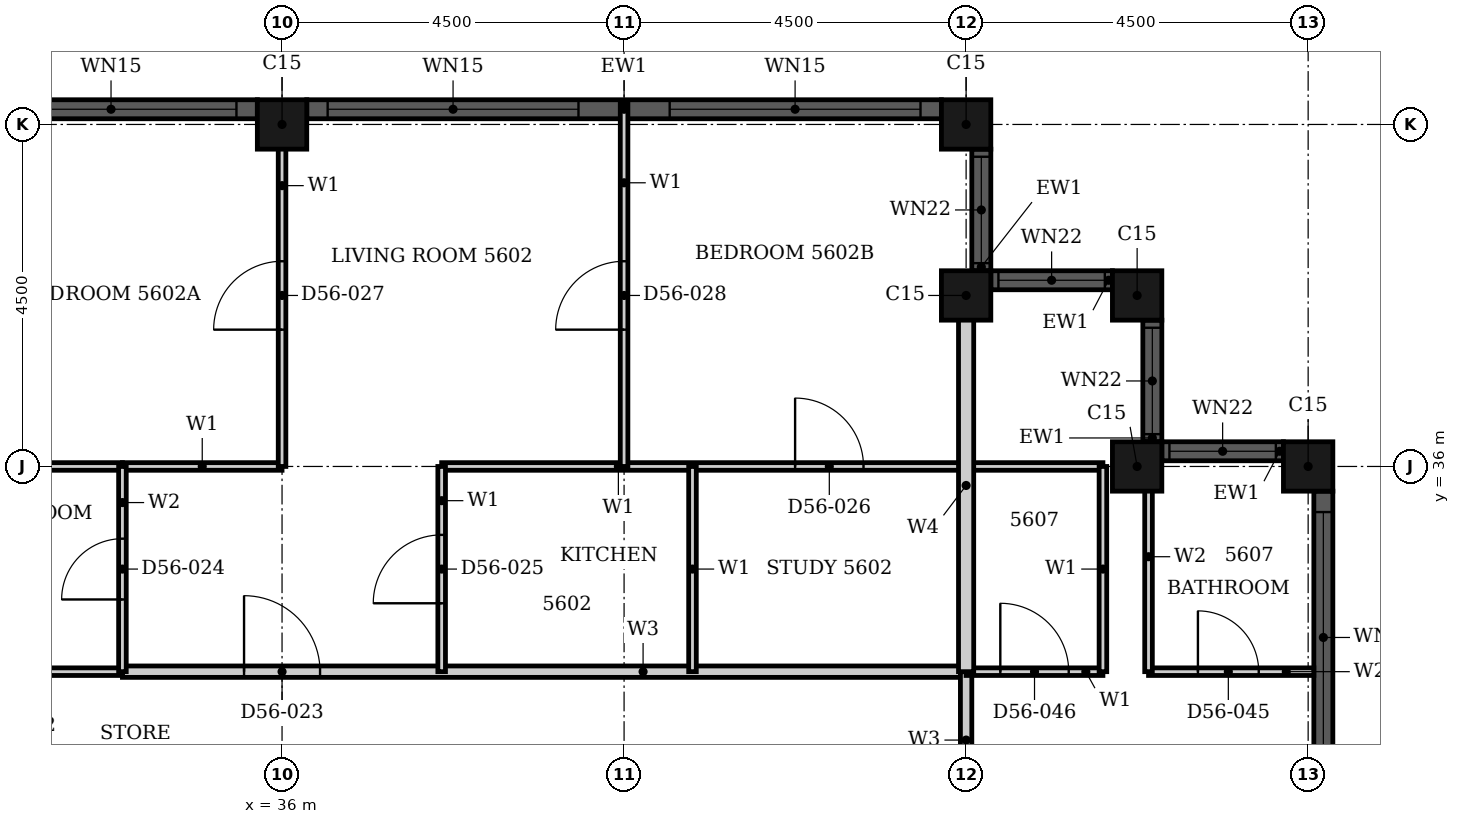
"""IFC4 building model, lengths in metres.
Left out: names, types, materials, properties, quantities, classifications, styles, units other than length and angle.
Written with IfcOpenShell. Run it as: python <this file> out.ifc"""

import sys

from ifc_helpers import new_model, si_unit, direction, frame, frame_2d, origin, origin_2d, place, context, subcontext, project, spatial, rectangle, hollow_rectangle, extrude, element, fill, save


model = new_model("IFC4")
c1 = context("Model", 3, precision=1e-05, world=origin(), true_north=direction((0.0, 1.0)))
c2 = subcontext(c1, "Body", "Model", "MODEL_VIEW")
j1 = project(units=[si_unit("LENGTHUNIT", "METRE"), si_unit("PLANEANGLEUNIT", "RADIAN")], contexts=[c1])
p1 = place(None, origin())
s1 = spatial("IfcSite", under=j1, at=p1, CompositionType="ELEMENT")
p2 = place(p1, origin())
s2 = spatial("IfcBuilding", under=s1, at=p2, CompositionType="ELEMENT")
p3 = place(p2, frame((0.0, 0.0, 222.0)))
s3 = spatial("IfcBuildingStorey", under=s2, at=p3, CompositionType="ELEMENT", Elevation=222.0)
for number, where, z_axis, x_axis in (
    (1, (49.5, 36.0, 0.0), (0.0, 0.0, 1.0), (1.0, 0.0, 0.0)),
    (2, (47.25, 36.0, 0.0), (0.0, 0.0, 1.0), (1.0, 0.0, 0.0)),
    (3, (47.25, 38.25, 0.0), (0.0, 0.0, 1.0), (1.0, 0.0, 0.0)),
    (4, (45.0, 38.25, 0.0), (0.0, 0.0, 1.0), (1.0, 0.0, 0.0)),
    (5, (45.0, 40.5, 0.0), (0.0, 0.0, 1.0), (1.0, 0.0, 0.0)),
    (6, (36.0, 40.5, 0.0), (0.0, 0.0, 1.0), (1.0, 0.0, 0.0)),
):
    element("IfcColumn", number, at=place(p3, frame(where, z_axis=z_axis, x_axis=x_axis)), inside=s3, PredefinedType="COLUMN", context=c2, shape_type="SweptSolid", body=[
        extrude(hollow_rectangle(XDim=0.65, YDim=0.65, WallThickness=0.021, at=origin_2d()), origin(), (0.0, 0.0, 1.0), 3.7),
    ])
p4 = place(p3, frame((49.7, 27.325, 0.0), z_axis=(0.0, 0.0, 1.0), x_axis=(0.0, 1.0, 0.0)))
e7 = element("IfcWall", 7, at=p4, inside=s3, PredefinedType="SOLIDWALL", context=c2, shape_type="SweptSolid", body=[
    extrude(rectangle(XDim=8.35, YDim=0.25, at=frame_2d((4.175, 0.0))), origin(), (0.0, 0.0, 1.0), 3.7),
])
p5 = place(p4, frame((0.275, 0.0, 0.45)))
e8 = element("IfcOpeningElement", 8, at=p5, cuts=e7, PredefinedType="OPENING", context=c2, shape_type="SweptSolid", body=[
    extrude(rectangle(XDim=3.3, YDim=2.3, at=frame_2d((1.65, 1.15))), frame((0.0, 0.135, 0.0), z_axis=(0.0, -1.0, 0.0), x_axis=(1.0, 0.0, 0.0)), (0.0, 0.0, 1.0), 0.27),
])
p6 = place(p4, frame((4.775, 0.0, 0.45)))
e9 = element("IfcOpeningElement", 9, at=p6, cuts=e7, PredefinedType="OPENING", context=c2, shape_type="SweptSolid", body=[
    extrude(rectangle(XDim=3.3, YDim=2.3, at=frame_2d((1.65, 1.15))), frame((0.0, 0.135, 0.0), z_axis=(0.0, -1.0, 0.0), x_axis=(1.0, 0.0, 0.0)), (0.0, 0.0, 1.0), 0.27),
])
p7 = place(p3, frame((49.175, 36.2, 0.0), z_axis=(0.0, 0.0, 1.0), x_axis=(-1.0, 0.0, 0.0)))
e10 = element("IfcWall", 10, at=p7, inside=s3, PredefinedType="SOLIDWALL", context=c2, shape_type="SweptSolid", body=[
    extrude(rectangle(XDim=1.6, YDim=0.25, at=frame_2d((0.8, 0.0))), origin(), (0.0, 0.0, 1.0), 3.7),
])
p8 = place(p7, frame((0.1, 0.0, 0.9)))
e11 = element("IfcOpeningElement", 11, at=p8, cuts=e10, PredefinedType="OPENING", context=c2, shape_type="SweptSolid", body=[
    extrude(rectangle(XDim=1.4, YDim=1.85, at=frame_2d((0.7, 0.925))), frame((0.0, 0.135, 0.0), z_axis=(0.0, -1.0, 0.0), x_axis=(1.0, 0.0, 0.0)), (0.0, 0.0, 1.0), 0.27),
])
p9 = place(p3, frame((47.45, 36.325, 0.0), z_axis=(0.0, 0.0, 1.0), x_axis=(0.0, 1.0, 0.0)))
e12 = element("IfcWall", 12, at=p9, inside=s3, PredefinedType="SOLIDWALL", context=c2, shape_type="SweptSolid", body=[
    extrude(rectangle(XDim=1.6, YDim=0.25, at=frame_2d((0.8, 0.0))), origin(), (0.0, 0.0, 1.0), 3.7),
])
p10 = place(p9, frame((0.1, 0.0, 0.9)))
e13 = element("IfcOpeningElement", 13, at=p10, cuts=e12, PredefinedType="OPENING", context=c2, shape_type="SweptSolid", body=[
    extrude(rectangle(XDim=1.4, YDim=1.85, at=frame_2d((0.7, 0.925))), frame((0.0, 0.135, 0.0), z_axis=(0.0, -1.0, 0.0), x_axis=(1.0, 0.0, 0.0)), (0.0, 0.0, 1.0), 0.27),
])
p11 = place(p3, frame((46.925, 38.45, 0.0), z_axis=(0.0, 0.0, 1.0), x_axis=(-1.0, 0.0, 0.0)))
e14 = element("IfcWall", 14, at=p11, inside=s3, PredefinedType="SOLIDWALL", context=c2, shape_type="SweptSolid", body=[
    extrude(rectangle(XDim=1.6, YDim=0.25, at=frame_2d((0.8, 0.0))), origin(), (0.0, 0.0, 1.0), 3.7),
])
p12 = place(p11, frame((0.1, 0.0, 0.9)))
e15 = element("IfcOpeningElement", 15, at=p12, cuts=e14, PredefinedType="OPENING", context=c2, shape_type="SweptSolid", body=[
    extrude(rectangle(XDim=1.4, YDim=1.85, at=frame_2d((0.7, 0.925))), frame((0.0, 0.135, 0.0), z_axis=(0.0, -1.0, 0.0), x_axis=(1.0, 0.0, 0.0)), (0.0, 0.0, 1.0), 0.27),
])
p13 = place(p3, frame((45.2, 38.575, 0.0), z_axis=(0.0, 0.0, 1.0), x_axis=(0.0, 1.0, 0.0)))
e16 = element("IfcWall", 16, at=p13, inside=s3, PredefinedType="SOLIDWALL", context=c2, shape_type="SweptSolid", body=[
    extrude(rectangle(XDim=1.6, YDim=0.25, at=frame_2d((0.8, 0.0))), origin(), (0.0, 0.0, 1.0), 3.7),
])
p14 = place(p13, frame((0.1, 0.0, 0.9)))
e17 = element("IfcOpeningElement", 17, at=p14, cuts=e16, PredefinedType="OPENING", context=c2, shape_type="SweptSolid", body=[
    extrude(rectangle(XDim=1.4, YDim=1.85, at=frame_2d((0.7, 0.925))), frame((0.0, 0.135, 0.0), z_axis=(0.0, -1.0, 0.0), x_axis=(1.0, 0.0, 0.0)), (0.0, 0.0, 1.0), 0.27),
])
p15 = place(p3, frame((44.675, 40.7, 0.0), z_axis=(0.0, 0.0, 1.0), x_axis=(-1.0, 0.0, 0.0)))
e18 = element("IfcWall", 18, at=p15, inside=s3, PredefinedType="SOLIDWALL", context=c2, shape_type="SweptSolid", body=[
    extrude(rectangle(XDim=8.35, YDim=0.25, at=frame_2d((4.175, 0.0))), origin(), (0.0, 0.0, 1.0), 3.7),
])
p16 = place(p15, frame((0.275, 0.0, 0.45)))
e19 = element("IfcOpeningElement", 19, at=p16, cuts=e18, PredefinedType="OPENING", context=c2, shape_type="SweptSolid", body=[
    extrude(rectangle(XDim=3.3, YDim=2.3, at=frame_2d((1.65, 1.15))), frame((0.0, 0.135, 0.0), z_axis=(0.0, -1.0, 0.0), x_axis=(1.0, 0.0, 0.0)), (0.0, 0.0, 1.0), 0.27),
])
p17 = place(p15, frame((4.775, 0.0, 0.45)))
e20 = element("IfcOpeningElement", 20, at=p17, cuts=e18, PredefinedType="OPENING", context=c2, shape_type="SweptSolid", body=[
    extrude(rectangle(XDim=3.3, YDim=2.3, at=frame_2d((1.65, 1.15))), frame((0.0, 0.135, 0.0), z_axis=(0.0, -1.0, 0.0), x_axis=(1.0, 0.0, 0.0)), (0.0, 0.0, 1.0), 0.27),
])
p18 = place(p3, frame((35.675, 40.7, 0.0), z_axis=(0.0, 0.0, 1.0), x_axis=(-1.0, 0.0, 0.0)))
e21 = element("IfcWall", 21, at=p18, inside=s3, PredefinedType="SOLIDWALL", context=c2, shape_type="SweptSolid", body=[
    extrude(rectangle(XDim=8.35, YDim=0.25, at=frame_2d((4.175, 0.0))), origin(), (0.0, 0.0, 1.0), 3.7),
])
p19 = place(p18, frame((0.275, 0.0, 0.45)))
e22 = element("IfcOpeningElement", 22, at=p19, cuts=e21, PredefinedType="OPENING", context=c2, shape_type="SweptSolid", body=[
    extrude(rectangle(XDim=3.3, YDim=2.3, at=frame_2d((1.65, 1.15))), frame((0.0, 0.135, 0.0), z_axis=(0.0, -1.0, 0.0), x_axis=(1.0, 0.0, 0.0)), (0.0, 0.0, 1.0), 0.27),
])
p20 = place(p18, frame((4.775, 0.0, 0.45)))
e23 = element("IfcOpeningElement", 23, at=p20, cuts=e21, PredefinedType="OPENING", context=c2, shape_type="SweptSolid", body=[
    extrude(rectangle(XDim=3.3, YDim=2.3, at=frame_2d((1.65, 1.15))), frame((0.0, 0.135, 0.0), z_axis=(0.0, -1.0, 0.0), x_axis=(1.0, 0.0, 0.0)), (0.0, 0.0, 1.0), 0.27),
])
p21 = place(p3, frame((33.9, 33.3, 0.0), z_axis=(0.0, 0.0, 1.0), x_axis=(1.0, 0.0, 0.0)))
e24 = element("IfcWall", 24, at=p21, inside=s3, PredefinedType="PARTITIONING", context=c2, shape_type="SweptSolid", body=[
    extrude(rectangle(XDim=11.1, YDim=0.15, at=frame_2d((5.55, 0.0))), origin(), (0.0, 0.0, 1.0), 3.4),
])
p22 = place(p21, frame((1.6, 0.0, 0.0)))
e25 = element("IfcOpeningElement", 25, at=p22, cuts=e24, PredefinedType="OPENING", context=c2, shape_type="SweptSolid", body=[
    extrude(rectangle(XDim=1.0, YDim=2.2, at=frame_2d((0.5, 1.1))), frame((0.0, 0.085, 0.0), z_axis=(0.0, -1.0, 0.0), x_axis=(1.0, 0.0, 0.0)), (0.0, 0.0, 1.0), 0.17),
])
p23 = place(p3, frame((45.0, 31.5, 0.0), z_axis=(0.0, 0.0, 1.0), x_axis=(0.0, 1.0, 0.0)))
e26 = element("IfcWall", 26, at=p23, inside=s3, PredefinedType="PARTITIONING", context=c2, shape_type="SweptSolid", body=[
    extrude(rectangle(XDim=1.8, YDim=0.15, at=frame_2d((0.9, 0.0))), origin(), (0.0, 0.0, 1.0), 3.4),
])
p24 = place(p3, frame((45.0, 33.3, 0.0), z_axis=(0.0, 0.0, 1.0), x_axis=(1.0, 0.0, 0.0)))
e27 = element("IfcWall", 27, at=p24, inside=s3, PredefinedType="PARTITIONING", context=c2, shape_type="SweptSolid", body=[
    extrude(rectangle(XDim=1.8, YDim=0.1, at=frame_2d((0.9, 0.0))), origin(), (0.0, 0.0, 1.0), 3.4),
])
p25 = place(p24, frame((0.45, 0.0, 0.0)))
e28 = element("IfcOpeningElement", 28, at=p25, cuts=e27, PredefinedType="OPENING", context=c2, shape_type="SweptSolid", body=[
    extrude(rectangle(XDim=0.9, YDim=2.1, at=frame_2d((0.45, 1.05))), frame((0.0, 0.06, 0.0), z_axis=(0.0, -1.0, 0.0), x_axis=(1.0, 0.0, 0.0)), (0.0, 0.0, 1.0), 0.12),
])
p26 = place(p3, frame((33.9, 36.0, 0.0), z_axis=(0.0, 0.0, 1.0), x_axis=(1.0, 0.0, 0.0)))
e29 = element("IfcWall", 29, at=p26, inside=s3, PredefinedType="PARTITIONING", context=c2, shape_type="SweptSolid", body=[
    extrude(rectangle(XDim=2.1, YDim=0.1, at=frame_2d((1.05, 0.0))), origin(), (0.0, 0.0, 1.0), 3.4),
])
p27 = place(p3, frame((38.1, 36.0, 0.0), z_axis=(0.0, 0.0, 1.0), x_axis=(1.0, 0.0, 0.0)))
e30 = element("IfcWall", 30, at=p27, inside=s3, PredefinedType="PARTITIONING", context=c2, shape_type="SweptSolid", body=[
    extrude(rectangle(XDim=8.7, YDim=0.1, at=frame_2d((4.35, 0.0))), origin(), (0.0, 0.0, 1.0), 3.4),
])
p28 = place(p27, frame((4.65, 0.0, 0.0)))
e31 = element("IfcOpeningElement", 31, at=p28, cuts=e30, PredefinedType="OPENING", context=c2, shape_type="SweptSolid", body=[
    extrude(rectangle(XDim=0.9, YDim=2.1, at=frame_2d((0.45, 1.05))), frame((0.0, 0.06, 0.0), z_axis=(0.0, -1.0, 0.0), x_axis=(1.0, 0.0, 0.0)), (0.0, 0.0, 1.0), 0.12),
])
p29 = place(p3, frame((36.0, 36.0, 0.0), z_axis=(0.0, 0.0, 1.0), x_axis=(0.0, 1.0, 0.0)))
e32 = element("IfcWall", 32, at=p29, inside=s3, PredefinedType="PARTITIONING", context=c2, shape_type="SweptSolid", body=[
    extrude(rectangle(XDim=4.69, YDim=0.1, at=frame_2d((2.345, 0.0))), origin(), (0.0, 0.0, 1.0), 3.4),
])
p30 = place(p29, frame((1.8, 0.0, 0.0)))
e33 = element("IfcOpeningElement", 33, at=p30, cuts=e32, PredefinedType="OPENING", context=c2, shape_type="SweptSolid", body=[
    extrude(rectangle(XDim=0.9, YDim=2.1, at=frame_2d((0.45, 1.05))), frame((0.0, 0.06, 0.0), z_axis=(0.0, -1.0, 0.0), x_axis=(1.0, 0.0, 0.0)), (0.0, 0.0, 1.0), 0.12),
])
p31 = place(p3, frame((38.1, 33.3, 0.0), z_axis=(0.0, 0.0, 1.0), x_axis=(0.0, 1.0, 0.0)))
e34 = element("IfcWall", 34, at=p31, inside=s3, PredefinedType="PARTITIONING", context=c2, shape_type="SweptSolid", body=[
    extrude(rectangle(XDim=2.7, YDim=0.1, at=frame_2d((1.35, 0.0))), origin(), (0.0, 0.0, 1.0), 3.4),
])
p32 = place(p31, frame((0.9, 0.0, 0.0)))
e35 = element("IfcOpeningElement", 35, at=p32, cuts=e34, PredefinedType="OPENING", context=c2, shape_type="SweptSolid", body=[
    extrude(rectangle(XDim=0.9, YDim=2.1, at=frame_2d((0.45, 1.05))), frame((0.0, 0.06, 0.0), z_axis=(0.0, -1.0, 0.0), x_axis=(1.0, 0.0, 0.0)), (0.0, 0.0, 1.0), 0.12),
])
p33 = place(p3, frame((40.5, 36.0, 0.0), z_axis=(0.0, 0.0, 1.0), x_axis=(0.0, 1.0, 0.0)))
e36 = element("IfcWall", 36, at=p33, inside=s3, PredefinedType="PARTITIONING", context=c2, shape_type="SweptSolid", body=[
    extrude(rectangle(XDim=4.765, YDim=0.1, at=frame_2d((2.382, 0.0))), origin(), (0.0, 0.0, 1.0), 3.4),
])
p34 = place(p33, frame((1.8, 0.0, 0.0)))
e37 = element("IfcOpeningElement", 37, at=p34, cuts=e36, PredefinedType="OPENING", context=c2, shape_type="SweptSolid", body=[
    extrude(rectangle(XDim=0.9, YDim=2.1, at=frame_2d((0.45, 1.05))), frame((0.0, 0.06, 0.0), z_axis=(0.0, -1.0, 0.0), x_axis=(1.0, 0.0, 0.0)), (0.0, 0.0, 1.0), 0.12),
])
for number, where, z_axis, x_axis in (
    (38, (41.4, 33.3, 0.0), (0.0, 0.0, 1.0), (0.0, 1.0, 0.0)),
    (39, (46.8, 33.3, 0.0), (0.0, 0.0, 1.0), (0.0, 1.0, 0.0)),
):
    element("IfcWall", number, at=place(p3, frame(where, z_axis=z_axis, x_axis=x_axis)), inside=s3, PredefinedType="PARTITIONING", context=c2, shape_type="SweptSolid", body=[
        extrude(rectangle(XDim=2.7, YDim=0.1, at=frame_2d((1.35, 0.0))), origin(), (0.0, 0.0, 1.0), 3.4),
    ])
p35 = place(p3, frame((45.0, 33.3, 0.0), z_axis=(0.0, 0.0, 1.0), x_axis=(0.0, 1.0, 0.0)))
e40 = element("IfcWall", 40, at=p35, inside=s3, PredefinedType="PARTITIONING", context=c2, shape_type="SweptSolid", body=[
    extrude(rectangle(XDim=4.9, YDim=0.2, at=frame_2d((2.45, 0.0))), origin(), (0.0, 0.0, 1.0), 3.4),
])
p36 = place(p3, frame((31.5, 33.3, 0.0), z_axis=(0.0, 0.0, 1.0), x_axis=(1.0, 0.0, 0.0)))
e41 = element("IfcWall", 41, at=p36, inside=s3, PredefinedType="PARTITIONING", context=c2, shape_type="SweptSolid", body=[
    extrude(rectangle(XDim=2.4, YDim=0.1, at=frame_2d((1.2, 0.0))), origin(), (0.0, 0.0, 1.0), 3.4),
])
p37 = place(p3, frame((47.4, 33.3, 0.0), z_axis=(0.0, 0.0, 1.0), x_axis=(1.0, 0.0, 0.0)))
e42 = element("IfcWall", 42, at=p37, inside=s3, PredefinedType="PARTITIONING", context=c2, shape_type="SweptSolid", body=[
    extrude(rectangle(XDim=2.175, YDim=0.1, at=frame_2d((1.087, 0.0))), origin(), (0.0, 0.0, 1.0), 3.4),
])
p38 = place(p37, frame((0.65, 0.0, 0.0)))
e43 = element("IfcOpeningElement", 43, at=p38, cuts=e42, PredefinedType="OPENING", context=c2, shape_type="SweptSolid", body=[
    extrude(rectangle(XDim=0.8, YDim=2.1, at=frame_2d((0.4, 1.05))), frame((0.0, 0.06, 0.0), z_axis=(0.0, -1.0, 0.0), x_axis=(1.0, 0.0, 0.0)), (0.0, 0.0, 1.0), 0.12),
])
p39 = place(p3, frame((31.5, 36.0, 0.0), z_axis=(0.0, 0.0, 1.0), x_axis=(1.0, 0.0, 0.0)))
e44 = element("IfcWall", 44, at=p39, inside=s3, PredefinedType="PARTITIONING", context=c2, shape_type="SweptSolid", body=[
    extrude(rectangle(XDim=2.4, YDim=0.1, at=frame_2d((1.2, 0.0))), origin(), (0.0, 0.0, 1.0), 3.4),
])
p40 = place(p3, frame((33.9, 33.3, 0.0), z_axis=(0.0, 0.0, 1.0), x_axis=(0.0, 1.0, 0.0)))
e45 = element("IfcWall", 45, at=p40, inside=s3, PredefinedType="PARTITIONING", context=c2, shape_type="SweptSolid", body=[
    extrude(rectangle(XDim=2.7, YDim=0.1, at=frame_2d((1.35, 0.0))), origin(), (0.0, 0.0, 1.0), 3.4),
])
p41 = place(p40, frame((0.95, 0.0, 0.0)))
e46 = element("IfcOpeningElement", 46, at=p41, cuts=e45, PredefinedType="OPENING", context=c2, shape_type="SweptSolid", body=[
    extrude(rectangle(XDim=0.8, YDim=2.1, at=frame_2d((0.4, 1.05))), frame((0.0, 0.06, 0.0), z_axis=(0.0, -1.0, 0.0), x_axis=(1.0, 0.0, 0.0)), (0.0, 0.0, 1.0), 0.12),
])
p42 = place(p3, frame((47.4, 33.3, 0.0), z_axis=(0.0, 0.0, 1.0), x_axis=(0.0, 1.0, 0.0)))
e47 = element("IfcWall", 47, at=p42, inside=s3, PredefinedType="PARTITIONING", context=c2, shape_type="SweptSolid", body=[
    extrude(rectangle(XDim=3.025, YDim=0.1, at=frame_2d((1.512, 0.0))), origin(), (0.0, 0.0, 1.0), 3.4),
])
p43 = place(p6, origin())
e48 = element("IfcWindow", 48, at=p43, inside=s3, PartitioningType="SINGLE_PANEL", PredefinedType="WINDOW", context=c2, shape_type="SweptSolid", body=[
    extrude(rectangle(XDim=3.3, YDim=2.3, at=frame_2d((1.65, 1.15))), frame((0.0, 0.03, 0.0), z_axis=(0.0, -1.0, 0.0), x_axis=(1.0, 0.0, 0.0)), (0.0, 0.0, 1.0), 0.06),
])
fill(e9, e48)
p44 = place(p8, origin())
e49 = element("IfcWindow", 49, at=p44, inside=s3, PartitioningType="SINGLE_PANEL", PredefinedType="WINDOW", context=c2, shape_type="SweptSolid", body=[
    extrude(rectangle(XDim=1.4, YDim=1.85, at=frame_2d((0.7, 0.925))), frame((0.0, 0.03, 0.0), z_axis=(0.0, -1.0, 0.0), x_axis=(1.0, 0.0, 0.0)), (0.0, 0.0, 1.0), 0.06),
])
fill(e11, e49)
p45 = place(p10, origin())
e50 = element("IfcWindow", 50, at=p45, inside=s3, PartitioningType="SINGLE_PANEL", PredefinedType="WINDOW", context=c2, shape_type="SweptSolid", body=[
    extrude(rectangle(XDim=1.4, YDim=1.85, at=frame_2d((0.7, 0.925))), frame((0.0, 0.03, 0.0), z_axis=(0.0, -1.0, 0.0), x_axis=(1.0, 0.0, 0.0)), (0.0, 0.0, 1.0), 0.06),
])
fill(e13, e50)
p46 = place(p12, origin())
e51 = element("IfcWindow", 51, at=p46, inside=s3, PartitioningType="SINGLE_PANEL", PredefinedType="WINDOW", context=c2, shape_type="SweptSolid", body=[
    extrude(rectangle(XDim=1.4, YDim=1.85, at=frame_2d((0.7, 0.925))), frame((0.0, 0.03, 0.0), z_axis=(0.0, -1.0, 0.0), x_axis=(1.0, 0.0, 0.0)), (0.0, 0.0, 1.0), 0.06),
])
fill(e15, e51)
p47 = place(p14, origin())
e52 = element("IfcWindow", 52, at=p47, inside=s3, PartitioningType="SINGLE_PANEL", PredefinedType="WINDOW", context=c2, shape_type="SweptSolid", body=[
    extrude(rectangle(XDim=1.4, YDim=1.85, at=frame_2d((0.7, 0.925))), frame((0.0, 0.03, 0.0), z_axis=(0.0, -1.0, 0.0), x_axis=(1.0, 0.0, 0.0)), (0.0, 0.0, 1.0), 0.06),
])
fill(e17, e52)
p48 = place(p16, origin())
e53 = element("IfcWindow", 53, at=p48, inside=s3, PartitioningType="SINGLE_PANEL", PredefinedType="WINDOW", context=c2, shape_type="SweptSolid", body=[
    extrude(rectangle(XDim=3.3, YDim=2.3, at=frame_2d((1.65, 1.15))), frame((0.0, 0.03, 0.0), z_axis=(0.0, -1.0, 0.0), x_axis=(1.0, 0.0, 0.0)), (0.0, 0.0, 1.0), 0.06),
])
fill(e19, e53)
p49 = place(p17, origin())
e54 = element("IfcWindow", 54, at=p49, inside=s3, PartitioningType="SINGLE_PANEL", PredefinedType="WINDOW", context=c2, shape_type="SweptSolid", body=[
    extrude(rectangle(XDim=3.3, YDim=2.3, at=frame_2d((1.65, 1.15))), frame((0.0, 0.03, 0.0), z_axis=(0.0, -1.0, 0.0), x_axis=(1.0, 0.0, 0.0)), (0.0, 0.0, 1.0), 0.06),
])
fill(e20, e54)
p50 = place(p19, origin())
e55 = element("IfcWindow", 55, at=p50, inside=s3, PartitioningType="SINGLE_PANEL", PredefinedType="WINDOW", context=c2, shape_type="SweptSolid", body=[
    extrude(rectangle(XDim=3.3, YDim=2.3, at=frame_2d((1.65, 1.15))), frame((0.0, 0.03, 0.0), z_axis=(0.0, -1.0, 0.0), x_axis=(1.0, 0.0, 0.0)), (0.0, 0.0, 1.0), 0.06),
])
fill(e22, e55)
p51 = place(p22, origin())
e56 = element("IfcDoor", 56, at=p51, inside=s3, OperationType="SINGLE_SWING_RIGHT", PredefinedType="DOOR", context=c2, shape_type="SweptSolid", body=[
    extrude(rectangle(XDim=1.0, YDim=2.2, at=frame_2d((0.5, 1.1))), frame((0.0, 0.025, 0.0), z_axis=(0.0, -1.0, 0.0), x_axis=(1.0, 0.0, 0.0)), (0.0, 0.0, 1.0), 0.05),
])
fill(e25, e56)
p52 = place(p41, origin())
e57 = element("IfcDoor", 57, at=p52, inside=s3, OperationType="SINGLE_SWING_RIGHT", PredefinedType="DOOR", context=c2, shape_type="SweptSolid", body=[
    extrude(rectangle(XDim=0.8, YDim=2.1, at=frame_2d((0.4, 1.05))), frame((0.0, 0.025, 0.0), z_axis=(0.0, -1.0, 0.0), x_axis=(1.0, 0.0, 0.0)), (0.0, 0.0, 1.0), 0.05),
])
fill(e46, e57)
p53 = place(p32, origin())
e58 = element("IfcDoor", 58, at=p53, inside=s3, OperationType="SINGLE_SWING_RIGHT", PredefinedType="DOOR", context=c2, shape_type="SweptSolid", body=[
    extrude(rectangle(XDim=0.9, YDim=2.1, at=frame_2d((0.45, 1.05))), frame((0.0, 0.025, 0.0), z_axis=(0.0, -1.0, 0.0), x_axis=(1.0, 0.0, 0.0)), (0.0, 0.0, 1.0), 0.05),
])
fill(e35, e58)
p54 = place(p28, origin())
e59 = element("IfcDoor", 59, at=p54, inside=s3, OperationType="SINGLE_SWING_RIGHT", PredefinedType="DOOR", context=c2, shape_type="SweptSolid", body=[
    extrude(rectangle(XDim=0.9, YDim=2.1, at=frame_2d((0.45, 1.05))), frame((0.0, 0.025, 0.0), z_axis=(0.0, -1.0, 0.0), x_axis=(1.0, 0.0, 0.0)), (0.0, 0.0, 1.0), 0.05),
])
fill(e31, e59)
p55 = place(p30, origin())
e60 = element("IfcDoor", 60, at=p55, inside=s3, OperationType="SINGLE_SWING_RIGHT", PredefinedType="DOOR", context=c2, shape_type="SweptSolid", body=[
    extrude(rectangle(XDim=0.9, YDim=2.1, at=frame_2d((0.45, 1.05))), frame((0.0, 0.025, 0.0), z_axis=(0.0, -1.0, 0.0), x_axis=(1.0, 0.0, 0.0)), (0.0, 0.0, 1.0), 0.05),
])
fill(e33, e60)
p56 = place(p34, origin())
e61 = element("IfcDoor", 61, at=p56, inside=s3, OperationType="SINGLE_SWING_LEFT", PredefinedType="DOOR", context=c2, shape_type="SweptSolid", body=[
    extrude(rectangle(XDim=0.9, YDim=2.1, at=frame_2d((0.45, 1.05))), frame((0.0, 0.025, 0.0), z_axis=(0.0, -1.0, 0.0), x_axis=(1.0, 0.0, 0.0)), (0.0, 0.0, 1.0), 0.05),
])
fill(e37, e61)
p57 = place(p38, origin())
e62 = element("IfcDoor", 62, at=p57, inside=s3, OperationType="SINGLE_SWING_RIGHT", PredefinedType="DOOR", context=c2, shape_type="SweptSolid", body=[
    extrude(rectangle(XDim=0.8, YDim=2.1, at=frame_2d((0.4, 1.05))), frame((0.0, 0.025, 0.0), z_axis=(0.0, -1.0, 0.0), x_axis=(1.0, 0.0, 0.0)), (0.0, 0.0, 1.0), 0.05),
])
fill(e43, e62)
p58 = place(p25, origin())
e63 = element("IfcDoor", 63, at=p58, inside=s3, OperationType="SINGLE_SWING_LEFT", PredefinedType="DOOR", context=c2, shape_type="SweptSolid", body=[
    extrude(rectangle(XDim=0.9, YDim=2.1, at=frame_2d((0.45, 1.05))), frame((0.0, 0.025, 0.0), z_axis=(0.0, -1.0, 0.0), x_axis=(1.0, 0.0, 0.0)), (0.0, 0.0, 1.0), 0.05),
])
fill(e28, e63)
save(model, sys.argv[1])
